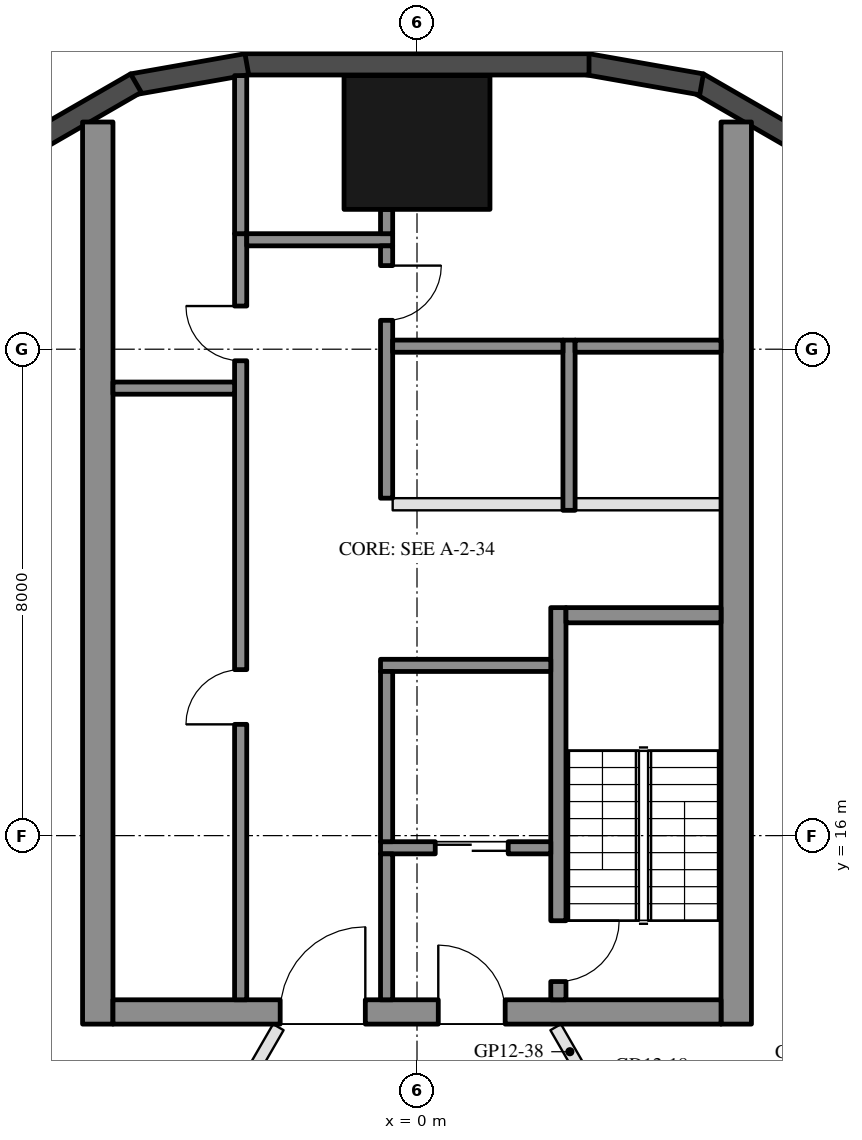
"""IFC4 building model, lengths in metres.
Left out: names, types, materials, properties, quantities, classifications, styles, units other than length and angle.
Written with IfcOpenShell. Run it as: python <this file> out.ifc"""

import sys

from ifc_helpers import new_model, si_unit, direction, frame, frame_2d, origin, origin_2d, place, context, subcontext, project, spatial, rectangle, hollow_rectangle, extrude, element, fill, save


model = new_model("IFC4")
c1 = context("Model", 3, precision=1e-05, world=origin(), true_north=direction((0.0, 1.0)))
c2 = subcontext(c1, "Body", "Model", "MODEL_VIEW")
j1 = project(units=[si_unit("LENGTHUNIT", "METRE"), si_unit("PLANEANGLEUNIT", "RADIAN")], contexts=[c1])
p1 = place(None, origin())
s1 = spatial("IfcSite", under=j1, at=p1, CompositionType="ELEMENT")
p2 = place(p1, origin())
s2 = spatial("IfcBuilding", under=s1, at=p2, CompositionType="ELEMENT")
p3 = place(p2, frame((0.0, 0.0, 150.3)))
s3 = spatial("IfcBuildingStorey", under=s2, at=p3, CompositionType="ELEMENT", Elevation=150.3)
p4 = place(p3, frame((0.0, 27.4, 0.0), z_axis=(0.0, 0.0, 1.0), x_axis=(1.0, 0.0, 0.0)))
e1 = element("IfcColumn", 1, at=p4, inside=s3, PredefinedType="COLUMN", context=c2, shape_type="SweptSolid", body=[
    extrude(hollow_rectangle(XDim=2.4, YDim=2.2, WallThickness=0.06, at=origin_2d()), origin(), (0.0, 0.0, 1.0), 3.7),
])
for number, where, z_axis, x_axis in (
    (2, (6.277, 27.422, 0.0), (0.0, 0.0, 1.0), (-0.866, 0.5, 0.0)),
    (3, (4.68, 28.356, 0.0), (0.0, 0.0, 1.0), (-0.985, 0.174, 0.0)),
):
    element("IfcWall", number, at=place(p3, frame(where, z_axis=z_axis, x_axis=x_axis)), inside=s3, PredefinedType="SOLIDWALL", context=c2, shape_type="SweptSolid", body=[
        extrude(rectangle(XDim=1.91, YDim=0.35, at=frame_2d((0.955, 0.0))), origin(), (0.0, 0.0, 1.0), 3.55),
    ])
p5 = place(p3, frame((2.829, 28.685, 0.0), z_axis=(0.0, 0.0, 1.0), x_axis=(-1.0, 0.0, 0.0)))
e4 = element("IfcWall", 4, at=p5, inside=s3, PredefinedType="SOLIDWALL", context=c2, shape_type="SweptSolid", body=[
    extrude(rectangle(XDim=5.658, YDim=0.35, at=frame_2d((2.829, 0.0))), origin(), (0.0, 0.0, 1.0), 3.55),
])
for number, where, z_axis, x_axis in (
    (5, (-2.799, 28.688, 0.0), (0.0, 0.0, 1.0), (-0.985, -0.174, 0.0)),
    (6, (-4.623, 28.377, 0.0), (0.0, 0.0, 1.0), (-0.866, -0.5, 0.0)),
):
    element("IfcWall", number, at=place(p3, frame(where, z_axis=z_axis, x_axis=x_axis)), inside=s3, PredefinedType="SOLIDWALL", context=c2, shape_type="SweptSolid", body=[
        extrude(rectangle(XDim=1.91, YDim=0.35, at=frame_2d((0.955, 0.0))), origin(), (0.0, 0.0, 1.0), 3.55),
    ])
for number, where, z_axis, x_axis in (
    (7, (5.25, 12.9, 0.0), (0.0, 0.0, 1.0), (0.0, 1.0, 0.0)),
    (8, (-5.25, 12.9, 0.0), (0.0, 0.0, 1.0), (0.0, 1.0, 0.0)),
):
    element("IfcWall", number, at=place(p3, frame(where, z_axis=z_axis, x_axis=x_axis)), inside=s3, PredefinedType="SHEAR", context=c2, shape_type="SweptSolid", body=[
        extrude(rectangle(XDim=14.837, YDim=0.5, at=frame_2d((7.418, 0.0))), origin(), (0.0, 0.0, 1.0), 3.5),
    ])
p6 = place(p3, frame((5.0, 13.1, 0.0), z_axis=(0.0, 0.0, 1.0), x_axis=(-1.0, 0.0, 0.0)))
e9 = element("IfcWall", 9, at=p6, inside=s3, PredefinedType="SHEAR", context=c2, shape_type="SweptSolid", body=[
    extrude(rectangle(XDim=10.0, YDim=0.4, at=frame_2d((5.0, 0.0))), origin(), (0.0, 0.0, 1.0), 3.5),
])
p7 = place(p6, frame((3.55, 0.0, 0.0)))
e10 = element("IfcOpeningElement", 10, at=p7, cuts=e9, PredefinedType="OPENING", context=c2, shape_type="SweptSolid", body=[
    extrude(rectangle(XDim=1.1, YDim=2.1, at=frame_2d((0.55, 1.05))), frame((0.0, 0.21, 0.0), z_axis=(0.0, -1.0, 0.0), x_axis=(1.0, 0.0, 0.0)), (0.0, 0.0, 1.0), 0.42),
])
p8 = place(p6, frame((5.85, 0.0, 0.0)))
e11 = element("IfcOpeningElement", 11, at=p8, cuts=e9, PredefinedType="OPENING", context=c2, shape_type="SweptSolid", body=[
    extrude(rectangle(XDim=1.4, YDim=2.1, at=frame_2d((0.7, 1.05))), frame((0.0, 0.21, 0.0), z_axis=(0.0, -1.0, 0.0), x_axis=(1.0, 0.0, 0.0)), (0.0, 0.0, 1.0), 0.42),
])
p9 = place(p3, frame((2.325, 13.3, 0.0), z_axis=(0.0, 0.0, 1.0), x_axis=(0.0, 1.0, 0.0)))
e12 = element("IfcWall", 12, at=p9, inside=s3, PredefinedType="SHEAR", context=c2, shape_type="SweptSolid", body=[
    extrude(rectangle(XDim=6.45, YDim=0.25, at=frame_2d((3.225, 0.0))), origin(), (0.0, 0.0, 1.0), 3.5),
])
p10 = place(p9, frame((0.3, 0.0, 0.0)))
e13 = element("IfcOpeningElement", 13, at=p10, cuts=e12, PredefinedType="OPENING", context=c2, shape_type="SweptSolid", body=[
    extrude(rectangle(XDim=1.0, YDim=2.1, at=frame_2d((0.5, 1.05))), frame((0.0, 0.135, 0.0), z_axis=(0.0, -1.0, 0.0), x_axis=(1.0, 0.0, 0.0)), (0.0, 0.0, 1.0), 0.27),
])
p11 = place(p3, frame((5.0, 19.625, 0.0), z_axis=(0.0, 0.0, 1.0), x_axis=(-1.0, 0.0, 0.0)))
e14 = element("IfcWall", 14, at=p11, inside=s3, PredefinedType="SHEAR", context=c2, shape_type="SweptSolid", body=[
    extrude(rectangle(XDim=2.55, YDim=0.25, at=frame_2d((1.275, 0.0))), origin(), (0.0, 0.0, 1.0), 3.5),
])
p12 = place(p3, frame((2.2, 18.8, 0.0), z_axis=(0.0, 0.0, 1.0), x_axis=(-1.0, 0.0, 0.0)))
e15 = element("IfcWall", 15, at=p12, inside=s3, PredefinedType="SHEAR", context=c2, shape_type="SweptSolid", body=[
    extrude(rectangle(XDim=2.8, YDim=0.2, at=frame_2d((1.4, 0.0))), origin(), (0.0, 0.0, 1.0), 3.5),
])
p13 = place(p3, frame((2.2, 15.8, 0.0), z_axis=(0.0, 0.0, 1.0), x_axis=(-1.0, 0.0, 0.0)))
e16 = element("IfcWall", 16, at=p13, inside=s3, PredefinedType="SHEAR", context=c2, shape_type="SweptSolid", body=[
    extrude(rectangle(XDim=2.8, YDim=0.2, at=frame_2d((1.4, 0.0))), origin(), (0.0, 0.0, 1.0), 3.5),
])
p14 = place(p13, frame((0.7, 0.0, 0.0)))
e17 = element("IfcOpeningElement", 17, at=p14, cuts=e16, PredefinedType="OPENING", context=c2, shape_type="SweptSolid", body=[
    extrude(rectangle(XDim=1.2, YDim=2.1, at=frame_2d((0.6, 1.05))), frame((0.0, 0.11, 0.0), z_axis=(0.0, -1.0, 0.0), x_axis=(1.0, 0.0, 0.0)), (0.0, 0.0, 1.0), 0.22),
])
p15 = place(p3, frame((-0.5, 15.9, 0.0), z_axis=(0.0, 0.0, 1.0), x_axis=(0.0, 1.0, 0.0)))
e18 = element("IfcWall", 18, at=p15, inside=s3, PredefinedType="SHEAR", context=c2, shape_type="SweptSolid", body=[
    extrude(rectangle(XDim=2.8, YDim=0.2, at=frame_2d((1.4, 0.0))), origin(), (0.0, 0.0, 1.0), 3.5),
])
p16 = place(p3, frame((-0.5, 13.3, 0.0), z_axis=(0.0, 0.0, 1.0), x_axis=(0.0, 1.0, 0.0)))
e19 = element("IfcWall", 19, at=p16, inside=s3, PredefinedType="SHEAR", context=c2, shape_type="SweptSolid", body=[
    extrude(rectangle(XDim=2.4, YDim=0.2, at=frame_2d((1.2, 0.0))), origin(), (0.0, 0.0, 1.0), 3.5),
])
p17 = place(p3, frame((-2.9, 13.3, 0.0), z_axis=(0.0, 0.0, 1.0), x_axis=(0.0, 1.0, 0.0)))
e20 = element("IfcWall", 20, at=p17, inside=s3, PredefinedType="SHEAR", context=c2, shape_type="SweptSolid", body=[
    extrude(rectangle(XDim=12.6, YDim=0.2, at=frame_2d((6.3, 0.0))), origin(), (0.0, 0.0, 1.0), 3.5),
])
p18 = place(p17, frame((4.53, 0.0, 0.0)))
e21 = element("IfcOpeningElement", 21, at=p18, cuts=e20, PredefinedType="OPENING", context=c2, shape_type="SweptSolid", body=[
    extrude(rectangle(XDim=0.9, YDim=2.1, at=frame_2d((0.45, 1.05))), frame((0.0, 0.11, 0.0), z_axis=(0.0, -1.0, 0.0), x_axis=(1.0, 0.0, 0.0)), (0.0, 0.0, 1.0), 0.22),
])
p19 = place(p17, frame((10.51, 0.0, 0.0)))
e22 = element("IfcOpeningElement", 22, at=p19, cuts=e20, PredefinedType="OPENING", context=c2, shape_type="SweptSolid", body=[
    extrude(rectangle(XDim=0.9, YDim=2.1, at=frame_2d((0.45, 1.05))), frame((0.0, 0.11, 0.0), z_axis=(0.0, -1.0, 0.0), x_axis=(1.0, 0.0, 0.0)), (0.0, 0.0, 1.0), 0.22),
])
p20 = place(p3, frame((-0.4, 25.8, 0.0), z_axis=(0.0, 0.0, 1.0), x_axis=(-1.0, 0.0, 0.0)))
e23 = element("IfcWall", 23, at=p20, inside=s3, PredefinedType="SHEAR", context=c2, shape_type="SweptSolid", body=[
    extrude(rectangle(XDim=2.4, YDim=0.2, at=frame_2d((1.2, 0.0))), origin(), (0.0, 0.0, 1.0), 3.5),
])
p21 = place(p3, frame((-0.5, 21.55, 0.0), z_axis=(0.0, 0.0, 1.0), x_axis=(0.0, 1.0, 0.0)))
e24 = element("IfcWall", 24, at=p21, inside=s3, PredefinedType="SHEAR", context=c2, shape_type="SweptSolid", body=[
    extrude(rectangle(XDim=4.15, YDim=0.2, at=frame_2d((2.075, 0.0))), origin(), (0.0, 0.0, 1.0), 3.5),
])
p22 = place(p21, frame((2.925, 0.0, 0.0)))
e25 = element("IfcOpeningElement", 25, at=p22, cuts=e24, PredefinedType="OPENING", context=c2, shape_type="SweptSolid", body=[
    extrude(rectangle(XDim=0.9, YDim=2.1, at=frame_2d((0.45, 1.05))), frame((0.0, 0.11, 0.0), z_axis=(0.0, -1.0, 0.0), x_axis=(1.0, 0.0, 0.0)), (0.0, 0.0, 1.0), 0.22),
])
p23 = place(p3, frame((-3.0, 23.36, 0.0), z_axis=(0.0, 0.0, 1.0), x_axis=(-1.0, 0.0, 0.0)))
e26 = element("IfcWall", 26, at=p23, inside=s3, PredefinedType="SHEAR", context=c2, shape_type="SweptSolid", body=[
    extrude(rectangle(XDim=2.0, YDim=0.2, at=frame_2d((1.0, 0.0))), origin(), (0.0, 0.0, 1.0), 3.5),
])
p24 = place(p3, frame((-0.5, 25.9, 0.0), z_axis=(0.0, 0.0, 1.0), x_axis=(0.0, 1.0, 0.0)))
e27 = element("IfcWall", 27, at=p24, inside=s3, PredefinedType="SHEAR", context=c2, shape_type="SweptSolid", body=[
    extrude(rectangle(XDim=0.4, YDim=0.2, at=frame_2d((0.2, 0.0))), origin(), (0.0, 0.0, 1.0), 3.5),
])
p25 = place(p3, frame((-2.9, 25.9, 0.0), z_axis=(0.0, 0.0, 1.0), x_axis=(0.0, 1.0, 0.0)))
e28 = element("IfcWall", 28, at=p25, inside=s3, PredefinedType="SHEAR", context=c2, shape_type="SweptSolid", body=[
    extrude(rectangle(XDim=2.6, YDim=0.2, at=frame_2d((1.3, 0.0))), origin(), (0.0, 0.0, 1.0), 3.5),
])
p26 = place(p3, frame((2.5, 21.35, 0.0), z_axis=(0.0, 0.0, 1.0), x_axis=(0.0, 1.0, 0.0)))
e29 = element("IfcWall", 29, at=p26, inside=s3, PredefinedType="SHEAR", context=c2, shape_type="SweptSolid", body=[
    extrude(rectangle(XDim=2.8, YDim=0.2, at=frame_2d((1.4, 0.0))), origin(), (0.0, 0.0, 1.0), 3.5),
])
p27 = place(p3, frame((5.0, 24.05, 0.0), z_axis=(0.0, 0.0, 1.0), x_axis=(-1.0, 0.0, 0.0)))
e30 = element("IfcWall", 30, at=p27, inside=s3, PredefinedType="SHEAR", context=c2, shape_type="SweptSolid", body=[
    extrude(rectangle(XDim=2.4, YDim=0.2, at=frame_2d((1.2, 0.0))), origin(), (0.0, 0.0, 1.0), 3.5),
])
p28 = place(p3, frame((2.4, 24.05, 0.0), z_axis=(0.0, 0.0, 1.0), x_axis=(-1.0, 0.0, 0.0)))
e31 = element("IfcWall", 31, at=p28, inside=s3, PredefinedType="SHEAR", context=c2, shape_type="SweptSolid", body=[
    extrude(rectangle(XDim=2.8, YDim=0.2, at=frame_2d((1.4, 0.0))), origin(), (0.0, 0.0, 1.0), 3.5),
])
p29 = place(p3, frame((5.0, 21.45, 0.0), z_axis=(0.0, 0.0, 1.0), x_axis=(-1.0, 0.0, 0.0)))
e32 = element("IfcWall", 32, at=p29, inside=s3, PredefinedType="PARTITIONING", context=c2, shape_type="SweptSolid", body=[
    extrude(rectangle(XDim=2.4, YDim=0.2, at=frame_2d((1.2, 0.0))), origin(), (0.0, 0.0, 1.0), 3.5),
])
p30 = place(p3, frame((2.4, 21.45, 0.0), z_axis=(0.0, 0.0, 1.0), x_axis=(-1.0, 0.0, 0.0)))
e33 = element("IfcWall", 33, at=p30, inside=s3, PredefinedType="PARTITIONING", context=c2, shape_type="SweptSolid", body=[
    extrude(rectangle(XDim=2.8, YDim=0.2, at=frame_2d((1.4, 0.0))), origin(), (0.0, 0.0, 1.0), 3.5),
])
p31 = place(p3, frame((13.697, 14.836, 0.0), z_axis=(0.0, 0.0, 1.0), x_axis=(-0.866027479907, -0.499996404033, 0.0)))
e34 = element("IfcWall", 34, at=p31, inside=s3, PredefinedType="PARTITIONING", context=c2, shape_type="SweptSolid", body=[
    extrude(rectangle(XDim=10.98, YDim=0.2, at=frame_2d((5.49, 0.0))), origin(), (0.0, 0.0, 1.0), 3.06),
])
p32 = place(p3, frame((-13.911, 12.665, 0.0), z_axis=(0.0, 0.0, 1.0), x_axis=(0.898639294085, -0.438688293811, 0.0)))
e35 = element("IfcWall", 35, at=p32, inside=s3, PredefinedType="PARTITIONING", context=c2, shape_type="SweptSolid", body=[
    extrude(rectangle(XDim=10.104, YDim=0.2, at=frame_2d((5.052, 0.0))), origin(), (0.0, 0.0, 1.0), 2.95),
])
p33 = place(p3, frame((2.281, 12.85, 0.0), z_axis=(0.0, 0.0, 1.0), x_axis=(0.500008716408, -0.866020371305, 0.0)))
e36 = element("IfcWall", 36, at=p33, inside=s3, PredefinedType="PARTITIONING", context=c2, shape_type="SweptSolid", body=[
    extrude(rectangle(XDim=3.888, YDim=0.2, at=frame_2d((1.944, 0.0))), origin(), (0.0, 0.0, 1.0), 2.95),
])
p34 = place(p33, frame((1.444, 0.0, 0.0)))
e37 = element("IfcOpeningElement", 37, at=p34, cuts=e36, PredefinedType="OPENING", context=c2, shape_type="SweptSolid", body=[
    extrude(rectangle(XDim=1.0, YDim=2.1, at=frame_2d((0.5, 1.05))), frame((0.0, 0.11, 0.0), z_axis=(0.0, -1.0, 0.0), x_axis=(1.0, 0.0, 0.0)), (0.0, 0.0, 1.0), 0.22),
])
p35 = place(p3, frame((-4.871, 8.363, 0.0), z_axis=(0.0, 0.0, 1.0), x_axis=(0.500016142392, 0.86601608377, 0.0)))
e38 = element("IfcWall", 38, at=p35, inside=s3, PredefinedType="PARTITIONING", context=c2, shape_type="SweptSolid", body=[
    extrude(rectangle(XDim=5.181, YDim=0.2, at=frame_2d((2.59, 0.0))), origin(), (0.0, 0.0, 1.0), 2.95),
])
p36 = place(p35, frame((2.09, 0.0, 0.0)))
e39 = element("IfcOpeningElement", 39, at=p36, cuts=e38, PredefinedType="OPENING", context=c2, shape_type="SweptSolid", body=[
    extrude(rectangle(XDim=1.0, YDim=2.1, at=frame_2d((0.5, 1.05))), frame((0.0, 0.11, 0.0), z_axis=(0.0, -1.0, 0.0), x_axis=(1.0, 0.0, 0.0)), (0.0, 0.0, 1.0), 0.22),
])
p37 = place(p14, origin())
e40 = element("IfcDoor", 40, at=p37, inside=s3, OperationType="DOUBLE_DOOR_SLIDING", PredefinedType="DOOR", context=c2, shape_type="SweptSolid", body=[
    extrude(rectangle(XDim=1.2, YDim=2.1, at=frame_2d((0.6, 1.05))), frame((0.0, 0.025, 0.0), z_axis=(0.0, -1.0, 0.0), x_axis=(1.0, 0.0, 0.0)), (0.0, 0.0, 1.0), 0.05),
])
fill(e17, e40)
p38 = place(p18, origin())
e41 = element("IfcDoor", 41, at=p38, inside=s3, OperationType="SINGLE_SWING_LEFT", PredefinedType="DOOR", context=c2, shape_type="SweptSolid", body=[
    extrude(rectangle(XDim=0.9, YDim=2.1, at=frame_2d((0.45, 1.05))), frame((0.0, 0.025, 0.0), z_axis=(0.0, -1.0, 0.0), x_axis=(1.0, 0.0, 0.0)), (0.0, 0.0, 1.0), 0.05),
])
fill(e21, e41)
p39 = place(p19, origin())
e42 = element("IfcDoor", 42, at=p39, inside=s3, OperationType="SINGLE_SWING_RIGHT", PredefinedType="DOOR", context=c2, shape_type="SweptSolid", body=[
    extrude(rectangle(XDim=0.9, YDim=2.1, at=frame_2d((0.45, 1.05))), frame((0.0, 0.025, 0.0), z_axis=(0.0, -1.0, 0.0), x_axis=(1.0, 0.0, 0.0)), (0.0, 0.0, 1.0), 0.05),
])
fill(e22, e42)
p40 = place(p22, frame((0.9, 0.0, 0.0), z_axis=(0.0, 0.0, 1.0), x_axis=(-1.0, 0.0, 0.0)))
e43 = element("IfcDoor", 43, at=p40, inside=s3, OperationType="SINGLE_SWING_LEFT", PredefinedType="DOOR", context=c2, shape_type="SweptSolid", body=[
    extrude(rectangle(XDim=0.9, YDim=2.1, at=frame_2d((0.45, 1.05))), frame((0.0, 0.025, 0.0), z_axis=(0.0, -1.0, 0.0), x_axis=(1.0, 0.0, 0.0)), (0.0, 0.0, 1.0), 0.05),
])
fill(e25, e43)
p41 = place(p7, frame((1.1, 0.0, 0.0), z_axis=(0.0, 0.0, 1.0), x_axis=(-1.0, 0.0, 0.0)))
e44 = element("IfcDoor", 44, at=p41, inside=s3, OperationType="SINGLE_SWING_LEFT", PredefinedType="DOOR", context=c2, shape_type="SweptSolid", body=[
    extrude(rectangle(XDim=1.1, YDim=2.1, at=frame_2d((0.55, 1.05))), frame((0.0, 0.025, 0.0), z_axis=(0.0, -1.0, 0.0), x_axis=(1.0, 0.0, 0.0)), (0.0, 0.0, 1.0), 0.05),
])
fill(e10, e44)
p42 = place(p8, frame((1.4, 0.0, 0.0), z_axis=(0.0, 0.0, 1.0), x_axis=(-1.0, 0.0, 0.0)))
e45 = element("IfcDoor", 45, at=p42, inside=s3, OperationType="DOUBLE_DOOR_SINGLE_SWING", PredefinedType="DOOR", context=c2, shape_type="SweptSolid", body=[
    extrude(rectangle(XDim=1.4, YDim=2.1, at=frame_2d((0.7, 1.05))), frame((0.0, 0.025, 0.0), z_axis=(0.0, -1.0, 0.0), x_axis=(1.0, 0.0, 0.0)), (0.0, 0.0, 1.0), 0.05),
])
fill(e11, e45)
p43 = place(p10, frame((1.0, 0.0, 0.0), z_axis=(0.0, 0.0, 1.0), x_axis=(-1.0, 0.0, 0.0)))
e46 = element("IfcDoor", 46, at=p43, inside=s3, OperationType="SINGLE_SWING_LEFT", PredefinedType="DOOR", context=c2, shape_type="SweptSolid", body=[
    extrude(rectangle(XDim=1.0, YDim=2.1, at=frame_2d((0.5, 1.05))), frame((0.0, 0.025, 0.0), z_axis=(0.0, -1.0, 0.0), x_axis=(1.0, 0.0, 0.0)), (0.0, 0.0, 1.0), 0.05),
])
fill(e13, e46)
save(model, sys.argv[1])
